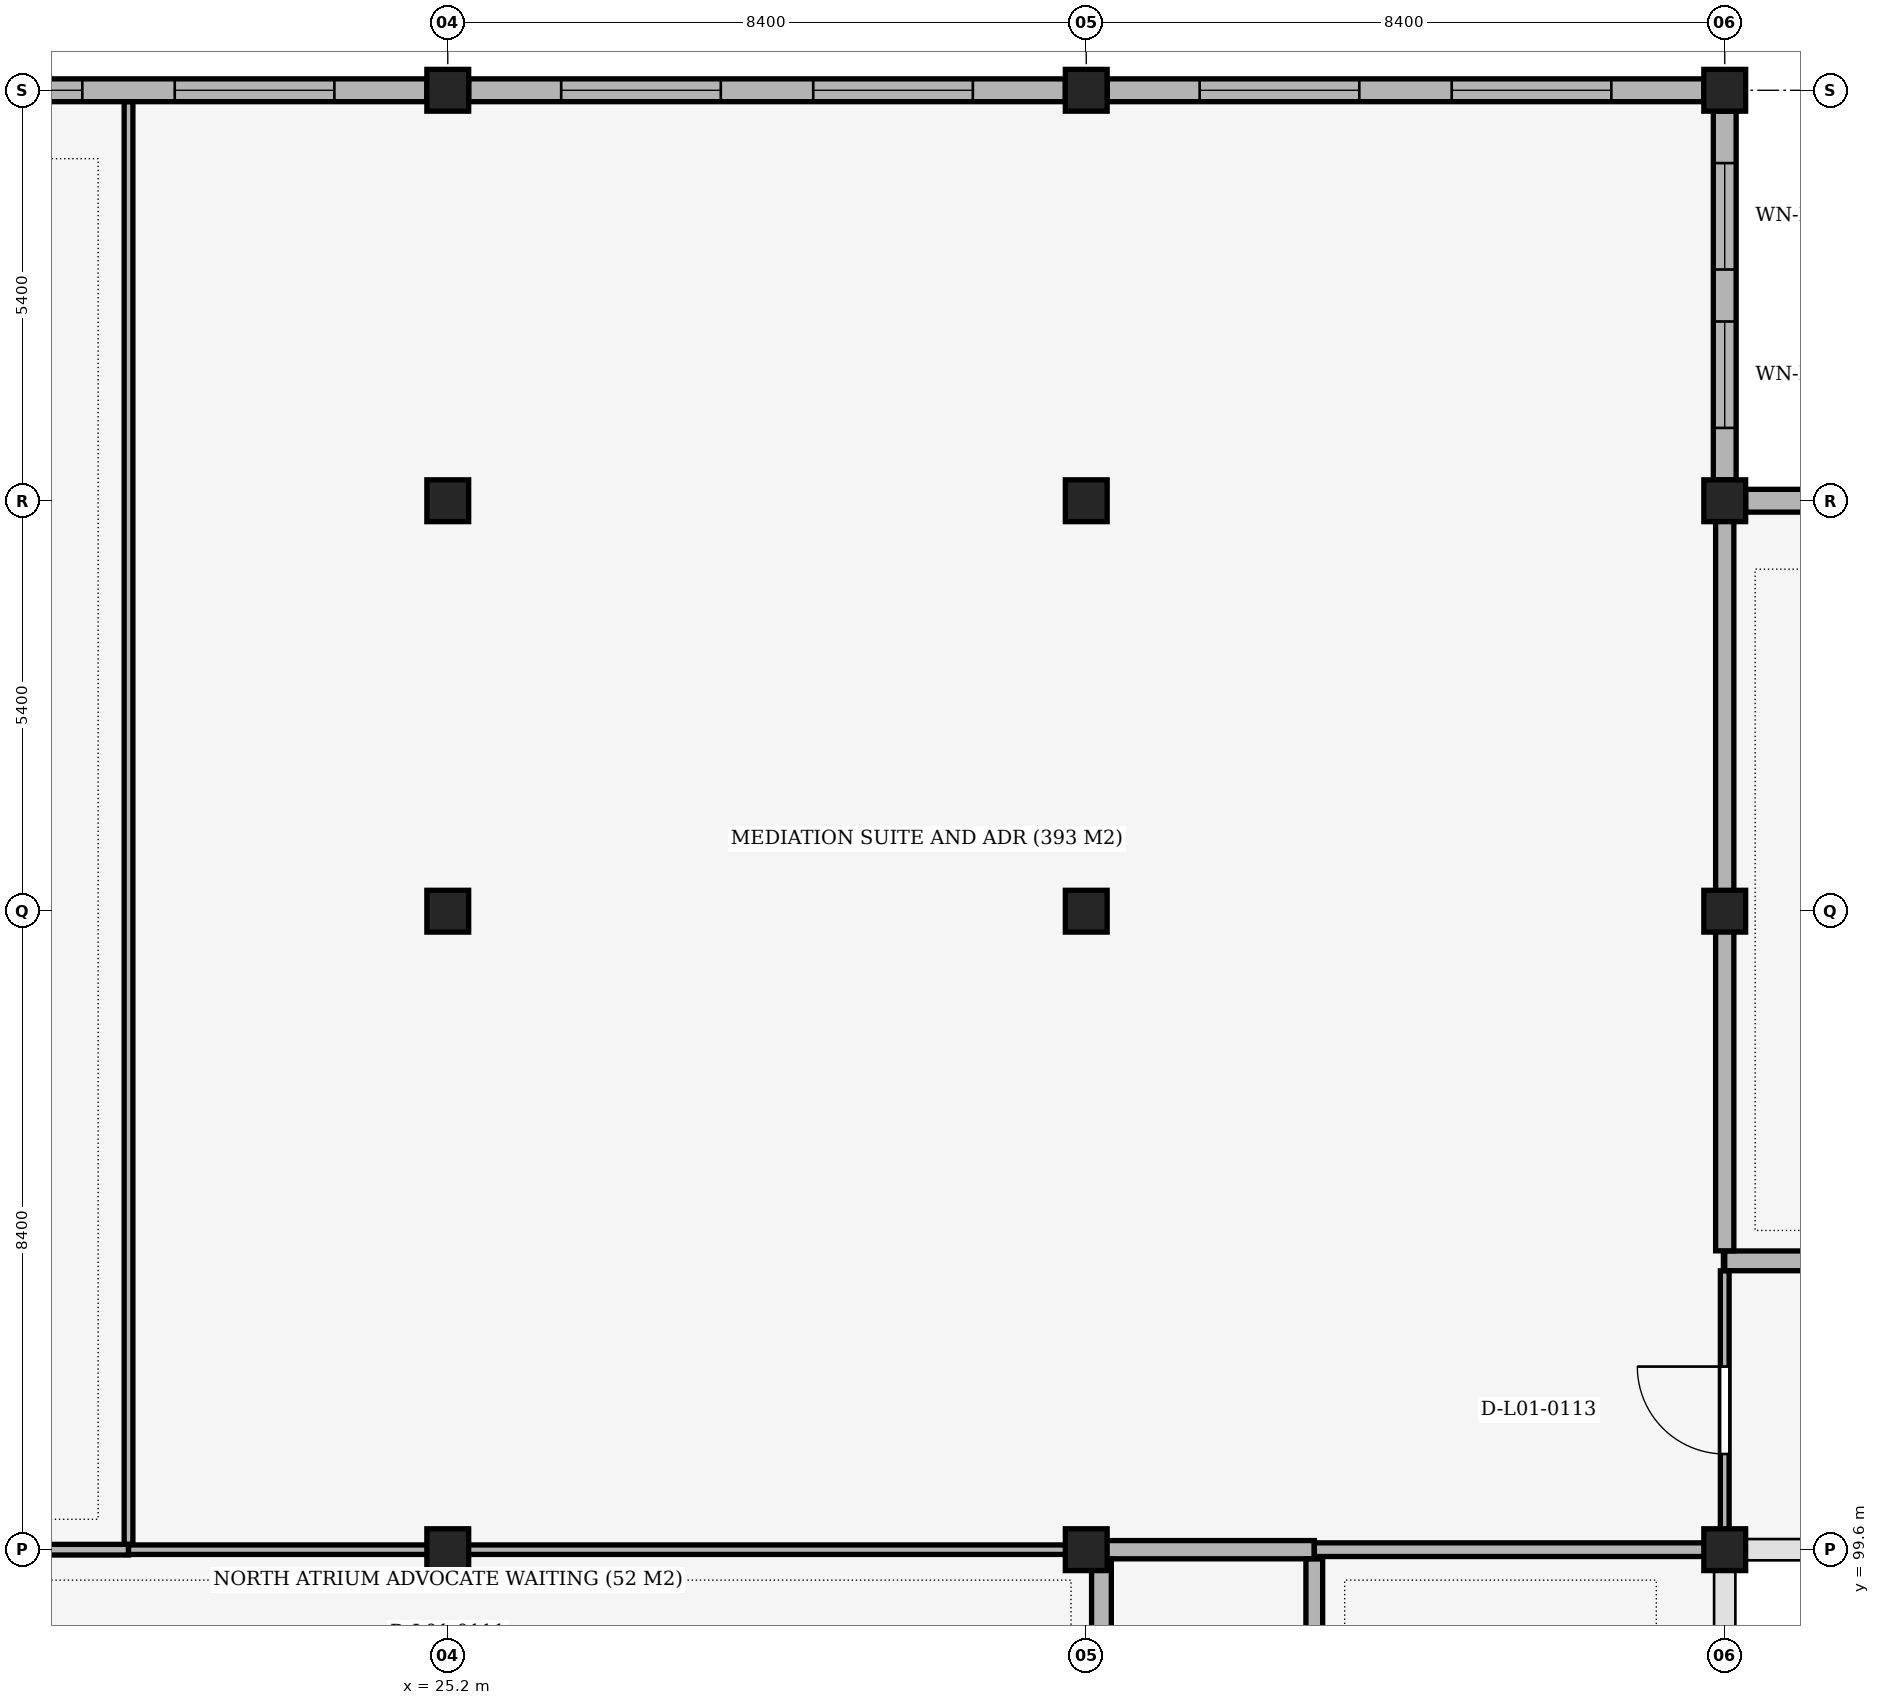
"""IFC4 building model, lengths in metres.
Left out: names, types, materials, properties, quantities, classifications, styles, units other than length and angle.
Written with IfcOpenShell. Run it as: python <this file> out.ifc"""

import sys

from ifc_helpers import new_model, si_unit, direction, frame, frame_2d, origin, origin_2d, place, context, subcontext, project, spatial, rectangle, extrude, element, fill, save


model = new_model("IFC4")
c1 = context("Model", 3, precision=1e-05, world=origin(), true_north=direction((0.0, 1.0)))
c2 = subcontext(c1, "Body", "Model", "MODEL_VIEW")
j1 = project(units=[si_unit("LENGTHUNIT", "METRE"), si_unit("PLANEANGLEUNIT", "RADIAN")], contexts=[c1])
p1 = place(None, origin())
s1 = spatial("IfcSite", under=j1, at=p1, CompositionType="ELEMENT")
p2 = place(p1, origin())
s2 = spatial("IfcBuilding", under=s1, at=p2, CompositionType="ELEMENT")
p3 = place(p2, frame((0.0, 0.0, 5.1)))
s3 = spatial("IfcBuildingStorey", under=s2, at=p3, CompositionType="ELEMENT", Elevation=5.1)
for number, where, z_axis, x_axis in (
    (1, (25.2, 99.6, 0.0), (0.0, 0.0, 1.0), (1.0, 0.0, 0.0)),
    (2, (25.2, 108.0, 0.0), (0.0, 0.0, 1.0), (1.0, 0.0, 0.0)),
    (3, (25.2, 113.4, 0.0), (0.0, 0.0, 1.0), (1.0, 0.0, 0.0)),
    (4, (25.2, 118.8, 0.0), (0.0, 0.0, 1.0), (1.0, 0.0, 0.0)),
    (5, (33.6, 99.6, 0.0), (0.0, 0.0, 1.0), (1.0, 0.0, 0.0)),
    (6, (33.6, 108.0, 0.0), (0.0, 0.0, 1.0), (1.0, 0.0, 0.0)),
    (7, (33.6, 113.4, 0.0), (0.0, 0.0, 1.0), (1.0, 0.0, 0.0)),
    (8, (33.6, 118.8, 0.0), (0.0, 0.0, 1.0), (1.0, 0.0, 0.0)),
    (9, (42.0, 99.6, 0.0), (0.0, 0.0, 1.0), (1.0, 0.0, 0.0)),
    (10, (42.0, 108.0, 0.0), (0.0, 0.0, 1.0), (1.0, 0.0, 0.0)),
    (11, (42.0, 113.4, 0.0), (0.0, 0.0, 1.0), (1.0, 0.0, 0.0)),
    (12, (42.0, 118.8, 0.0), (0.0, 0.0, 1.0), (1.0, 0.0, 0.0)),
):
    element("IfcColumn", number, at=place(p3, frame(where, z_axis=z_axis, x_axis=x_axis)), inside=s3, PredefinedType="COLUMN", context=c2, shape_type="SweptSolid", body=[
        extrude(rectangle(XDim=0.55, YDim=0.55, at=origin_2d()), origin(), (0.0, 0.0, 1.0), 5.1),
    ])
p4 = place(p3, frame((17.075, 118.8, 0.0), z_axis=(0.0, 0.0, 1.0), x_axis=(1.0, 0.0, 0.0)))
e13 = element("IfcWall", 13, at=p4, inside=s3, PredefinedType="SOLIDWALL", context=c2, shape_type="SweptSolid", body=[
    extrude(rectangle(XDim=7.85, YDim=0.3, at=frame_2d((3.925, 0.0))), origin(), (0.0, 0.0, 1.0), 4.43),
])
p5 = place(p4, frame((1.217, 0.0, 0.9)))
e14 = element("IfcOpeningElement", 14, at=p5, cuts=e13, PredefinedType="OPENING", context=c2, shape_type="SweptSolid", body=[
    extrude(rectangle(XDim=2.1, YDim=2.1, at=frame_2d((1.05, 1.05))), frame((0.0, 0.165, 0.0), z_axis=(0.0, -1.0, 0.0), x_axis=(1.0, 0.0, 0.0)), (0.0, 0.0, 1.0), 0.33),
])
p6 = place(p4, frame((4.533, 0.0, 0.9)))
e15 = element("IfcOpeningElement", 15, at=p6, cuts=e13, PredefinedType="OPENING", context=c2, shape_type="SweptSolid", body=[
    extrude(rectangle(XDim=2.1, YDim=2.1, at=frame_2d((1.05, 1.05))), frame((0.0, 0.165, 0.0), z_axis=(0.0, -1.0, 0.0), x_axis=(1.0, 0.0, 0.0)), (0.0, 0.0, 1.0), 0.33),
])
p7 = place(p3, frame((25.475, 118.8, 0.0), z_axis=(0.0, 0.0, 1.0), x_axis=(1.0, 0.0, 0.0)))
e16 = element("IfcWall", 16, at=p7, inside=s3, PredefinedType="SOLIDWALL", context=c2, shape_type="SweptSolid", body=[
    extrude(rectangle(XDim=7.85, YDim=0.3, at=frame_2d((3.925, 0.0))), origin(), (0.0, 0.0, 1.0), 4.43),
])
p8 = place(p7, frame((1.217, 0.0, 0.9)))
e17 = element("IfcOpeningElement", 17, at=p8, cuts=e16, PredefinedType="OPENING", context=c2, shape_type="SweptSolid", body=[
    extrude(rectangle(XDim=2.1, YDim=2.1, at=frame_2d((1.05, 1.05))), frame((0.0, 0.165, 0.0), z_axis=(0.0, -1.0, 0.0), x_axis=(1.0, 0.0, 0.0)), (0.0, 0.0, 1.0), 0.33),
])
p9 = place(p7, frame((4.533, 0.0, 0.9)))
e18 = element("IfcOpeningElement", 18, at=p9, cuts=e16, PredefinedType="OPENING", context=c2, shape_type="SweptSolid", body=[
    extrude(rectangle(XDim=2.1, YDim=2.1, at=frame_2d((1.05, 1.05))), frame((0.0, 0.165, 0.0), z_axis=(0.0, -1.0, 0.0), x_axis=(1.0, 0.0, 0.0)), (0.0, 0.0, 1.0), 0.33),
])
p10 = place(p3, frame((33.875, 118.8, 0.0), z_axis=(0.0, 0.0, 1.0), x_axis=(1.0, 0.0, 0.0)))
e19 = element("IfcWall", 19, at=p10, inside=s3, PredefinedType="SOLIDWALL", context=c2, shape_type="SweptSolid", body=[
    extrude(rectangle(XDim=7.85, YDim=0.3, at=frame_2d((3.925, 0.0))), origin(), (0.0, 0.0, 1.0), 4.43),
])
p11 = place(p10, frame((1.217, 0.0, 0.9)))
e20 = element("IfcOpeningElement", 20, at=p11, cuts=e19, PredefinedType="OPENING", context=c2, shape_type="SweptSolid", body=[
    extrude(rectangle(XDim=2.1, YDim=2.1, at=frame_2d((1.05, 1.05))), frame((0.0, 0.165, 0.0), z_axis=(0.0, -1.0, 0.0), x_axis=(1.0, 0.0, 0.0)), (0.0, 0.0, 1.0), 0.33),
])
p12 = place(p10, frame((4.533, 0.0, 0.9)))
e21 = element("IfcOpeningElement", 21, at=p12, cuts=e19, PredefinedType="OPENING", context=c2, shape_type="SweptSolid", body=[
    extrude(rectangle(XDim=2.1, YDim=2.1, at=frame_2d((1.05, 1.05))), frame((0.0, 0.165, 0.0), z_axis=(0.0, -1.0, 0.0), x_axis=(1.0, 0.0, 0.0)), (0.0, 0.0, 1.0), 0.33),
])
p13 = place(p3, frame((42.0, 118.525, 0.0), z_axis=(0.0, 0.0, 1.0), x_axis=(0.0, -1.0, 0.0)))
e22 = element("IfcWall", 22, at=p13, inside=s3, PredefinedType="SOLIDWALL", context=c2, shape_type="SweptSolid", body=[
    extrude(rectangle(XDim=4.85, YDim=0.3, at=frame_2d((2.425, 0.0))), origin(), (0.0, 0.0, 1.0), 4.27),
])
p14 = place(p13, frame((0.683, 0.0, 0.85)))
e23 = element("IfcOpeningElement", 23, at=p14, cuts=e22, PredefinedType="OPENING", context=c2, shape_type="SweptSolid", body=[
    extrude(rectangle(XDim=1.4, YDim=2.4, at=frame_2d((0.7, 1.2))), frame((0.0, 0.165, 0.0), z_axis=(0.0, -1.0, 0.0), x_axis=(1.0, 0.0, 0.0)), (0.0, 0.0, 1.0), 0.33),
])
p15 = place(p13, frame((2.767, 0.0, 0.85)))
e24 = element("IfcOpeningElement", 24, at=p15, cuts=e22, PredefinedType="OPENING", context=c2, shape_type="SweptSolid", body=[
    extrude(rectangle(XDim=1.4, YDim=2.4, at=frame_2d((0.7, 1.2))), frame((0.0, 0.165, 0.0), z_axis=(0.0, -1.0, 0.0), x_axis=(1.0, 0.0, 0.0)), (0.0, 0.0, 1.0), 0.33),
])
p16 = place(p3, frame((42.275, 113.4, 0.0), z_axis=(0.0, 0.0, 1.0), x_axis=(1.0, 0.0, 0.0)))
e25 = element("IfcWall", 25, at=p16, inside=s3, PredefinedType="SOLIDWALL", context=c2, shape_type="SweptSolid", body=[
    extrude(rectangle(XDim=7.85, YDim=0.3, at=frame_2d((3.925, 0.0))), origin(), (0.0, 0.0, 1.0), 4.12),
])
p17 = place(p16, frame((1.217, 0.0, 0.9)))
e26 = element("IfcOpeningElement", 26, at=p17, cuts=e25, PredefinedType="OPENING", context=c2, shape_type="SweptSolid", body=[
    extrude(rectangle(XDim=2.1, YDim=2.1, at=frame_2d((1.05, 1.05))), frame((0.0, 0.165, 0.0), z_axis=(0.0, -1.0, 0.0), x_axis=(1.0, 0.0, 0.0)), (0.0, 0.0, 1.0), 0.33),
])
p18 = place(p16, frame((4.533, 0.0, 0.9)))
e27 = element("IfcOpeningElement", 27, at=p18, cuts=e25, PredefinedType="OPENING", context=c2, shape_type="SweptSolid", body=[
    extrude(rectangle(XDim=2.1, YDim=2.1, at=frame_2d((1.05, 1.05))), frame((0.0, 0.165, 0.0), z_axis=(0.0, -1.0, 0.0), x_axis=(1.0, 0.0, 0.0)), (0.0, 0.0, 1.0), 0.33),
])
p19 = place(p3, frame((33.8, 99.6, 0.0), z_axis=(0.0, 0.0, 1.0), x_axis=(1.0, 0.0, 0.0)))
e28 = element("IfcWall", 28, at=p19, inside=s3, PredefinedType="PARTITIONING", context=c2, shape_type="SweptSolid", body=[
    extrude(rectangle(XDim=2.8, YDim=0.24, at=frame_2d((1.4, 0.0))), origin(), (0.0, 0.0, 1.0), 4.12),
])
p20 = place(p3, frame((36.6, 99.6, 0.0), z_axis=(0.0, 0.0, 1.0), x_axis=(1.0, 0.0, 0.0)))
e29 = element("IfcWall", 29, at=p20, inside=s3, PredefinedType="PARTITIONING", context=c2, shape_type="SweptSolid", body=[
    extrude(rectangle(XDim=5.336, YDim=0.18, at=frame_2d((2.668, 0.0))), origin(), (0.0, 0.0, 1.0), 4.02),
])
p21 = place(p3, frame((16.6, 99.6, 0.0), z_axis=(0.0, 0.0, 1.0), x_axis=(1.0, 0.0, 0.0)))
e30 = element("IfcWall", 30, at=p21, inside=s3, PredefinedType="PARTITIONING", context=c2, shape_type="SweptSolid", body=[
    extrude(rectangle(XDim=4.4, YDim=0.14, at=frame_2d((2.2, 0.0))), origin(), (0.0, 0.0, 1.0), 4.02),
])
p22 = place(p3, frame((21.0, 99.6, 0.0), z_axis=(0.0, 0.0, 1.0), x_axis=(1.0, 0.0, 0.0)))
e31 = element("IfcWall", 31, at=p22, inside=s3, PredefinedType="PARTITIONING", context=c2, shape_type="SweptSolid", body=[
    extrude(rectangle(XDim=12.8, YDim=0.125, at=frame_2d((6.4, 0.0))), origin(), (0.0, 0.0, 1.0), 4.02),
])
p23 = place(p3, frame((42.0, 103.4, 0.0), z_axis=(0.0, 0.0, 1.0), x_axis=(1.0, 0.0, 0.0)))
e32 = element("IfcWall", 32, at=p23, inside=s3, PredefinedType="PARTITIONING", context=c2, shape_type="SweptSolid", body=[
    extrude(rectangle(XDim=25.2, YDim=0.26, at=frame_2d((12.6, 0.0))), origin(), (0.0, 0.0, 1.0), 4.02),
])
p24 = place(p23, frame((11.7, 0.0, 0.0)))
e33 = element("IfcOpeningElement", 33, at=p24, cuts=e32, PredefinedType="OPENING", context=c2, shape_type="SweptSolid", body=[
    extrude(rectangle(XDim=1.8, YDim=2.4, at=frame_2d((0.9, 1.2))), frame((0.0, 0.145, 0.0), z_axis=(0.0, -1.0, 0.0), x_axis=(1.0, 0.0, 0.0)), (0.0, 0.0, 1.0), 0.29),
])
p25 = place(p3, frame((21.0, 99.672, 0.0), z_axis=(0.0, 0.0, 1.0), x_axis=(0.0, 1.0, 0.0)))
e34 = element("IfcWall", 34, at=p25, inside=s3, PredefinedType="PARTITIONING", context=c2, shape_type="SweptSolid", body=[
    extrude(rectangle(XDim=18.976, YDim=0.115, at=frame_2d((9.488, 0.0))), origin(), (0.0, 0.0, 1.0), 4.12),
])
p26 = place(p3, frame((33.8, 96.722, 0.0), z_axis=(0.0, 0.0, 1.0), x_axis=(0.0, 1.0, 0.0)))
e35 = element("IfcWall", 35, at=p26, inside=s3, PredefinedType="PARTITIONING", context=c2, shape_type="SweptSolid", body=[
    extrude(rectangle(XDim=2.756, YDim=0.26, at=frame_2d((1.378, 0.0))), origin(), (0.0, 0.0, 1.0), 4.12),
])
p27 = place(p3, frame((36.6, 66.112, 0.0), z_axis=(0.0, 0.0, 1.0), x_axis=(0.0, 1.0, 0.0)))
e36 = element("IfcWall", 36, at=p27, inside=s3, PredefinedType="PARTITIONING", context=c2, shape_type="SweptSolid", body=[
    extrude(rectangle(XDim=33.366, YDim=0.22, at=frame_2d((16.683, 0.0))), origin(), (0.0, 0.0, 1.0), 4.07),
])
p28 = place(p27, frame((15.883, 0.0, 0.0)))
e37 = element("IfcOpeningElement", 37, at=p28, cuts=e36, PredefinedType="OPENING", context=c2, shape_type="SweptSolid", body=[
    extrude(rectangle(XDim=1.6, YDim=2.3, at=frame_2d((0.8, 1.15))), frame((0.0, 0.125, 0.0), z_axis=(0.0, -1.0, 0.0), x_axis=(1.0, 0.0, 0.0)), (0.0, 0.0, 1.0), 0.25),
])
p29 = place(p3, frame((42.0, 99.6, 0.0), z_axis=(0.0, 0.0, 1.0), x_axis=(0.0, 1.0, 0.0)))
e38 = element("IfcWall", 38, at=p29, inside=s3, PredefinedType="PARTITIONING", context=c2, shape_type="SweptSolid", body=[
    extrude(rectangle(XDim=3.668, YDim=0.115, at=frame_2d((1.834, 0.0))), origin(), (0.0, 0.0, 1.0), 4.02),
])
p30 = place(p29, frame((1.259, 0.0, 0.0)))
e39 = element("IfcOpeningElement", 39, at=p30, cuts=e38, PredefinedType="OPENING", context=c2, shape_type="SweptSolid", body=[
    extrude(rectangle(XDim=1.15, YDim=2.15, at=frame_2d((0.575, 1.075))), frame((0.0, 0.072, 0.0), z_axis=(0.0, -1.0, 0.0), x_axis=(1.0, 0.0, 0.0)), (0.0, 0.0, 1.0), 0.145),
])
p31 = place(p3, frame((42.0, 103.532, 0.0), z_axis=(0.0, 0.0, 1.0), x_axis=(0.0, 1.0, 0.0)))
e40 = element("IfcWall", 40, at=p31, inside=s3, PredefinedType="PARTITIONING", context=c2, shape_type="SweptSolid", body=[
    extrude(rectangle(XDim=9.794, YDim=0.24, at=frame_2d((4.897, 0.0))), origin(), (0.0, 0.0, 1.0), 4.02),
])
p32 = place(p5, origin())
e41 = element("IfcWindow", 41, at=p32, inside=s3, PartitioningType="SINGLE_PANEL", PredefinedType="WINDOW", context=c2, shape_type="SweptSolid", body=[
    extrude(rectangle(XDim=2.1, YDim=2.1, at=frame_2d((1.05, 1.05))), frame((0.0, 0.03, 0.0), z_axis=(0.0, -1.0, 0.0), x_axis=(1.0, 0.0, 0.0)), (0.0, 0.0, 1.0), 0.06),
])
fill(e14, e41)
p33 = place(p6, origin())
e42 = element("IfcWindow", 42, at=p33, inside=s3, PartitioningType="SINGLE_PANEL", PredefinedType="WINDOW", context=c2, shape_type="SweptSolid", body=[
    extrude(rectangle(XDim=2.1, YDim=2.1, at=frame_2d((1.05, 1.05))), frame((0.0, 0.03, 0.0), z_axis=(0.0, -1.0, 0.0), x_axis=(1.0, 0.0, 0.0)), (0.0, 0.0, 1.0), 0.06),
])
fill(e15, e42)
p34 = place(p8, origin())
e43 = element("IfcWindow", 43, at=p34, inside=s3, PartitioningType="SINGLE_PANEL", PredefinedType="WINDOW", context=c2, shape_type="SweptSolid", body=[
    extrude(rectangle(XDim=2.1, YDim=2.1, at=frame_2d((1.05, 1.05))), frame((0.0, 0.03, 0.0), z_axis=(0.0, -1.0, 0.0), x_axis=(1.0, 0.0, 0.0)), (0.0, 0.0, 1.0), 0.06),
])
fill(e17, e43)
p35 = place(p9, origin())
e44 = element("IfcWindow", 44, at=p35, inside=s3, PartitioningType="SINGLE_PANEL", PredefinedType="WINDOW", context=c2, shape_type="SweptSolid", body=[
    extrude(rectangle(XDim=2.1, YDim=2.1, at=frame_2d((1.05, 1.05))), frame((0.0, 0.03, 0.0), z_axis=(0.0, -1.0, 0.0), x_axis=(1.0, 0.0, 0.0)), (0.0, 0.0, 1.0), 0.06),
])
fill(e18, e44)
p36 = place(p11, origin())
e45 = element("IfcWindow", 45, at=p36, inside=s3, PartitioningType="SINGLE_PANEL", PredefinedType="WINDOW", context=c2, shape_type="SweptSolid", body=[
    extrude(rectangle(XDim=2.1, YDim=2.1, at=frame_2d((1.05, 1.05))), frame((0.0, 0.03, 0.0), z_axis=(0.0, -1.0, 0.0), x_axis=(1.0, 0.0, 0.0)), (0.0, 0.0, 1.0), 0.06),
])
fill(e20, e45)
p37 = place(p12, origin())
e46 = element("IfcWindow", 46, at=p37, inside=s3, PartitioningType="SINGLE_PANEL", PredefinedType="WINDOW", context=c2, shape_type="SweptSolid", body=[
    extrude(rectangle(XDim=2.1, YDim=2.1, at=frame_2d((1.05, 1.05))), frame((0.0, 0.03, 0.0), z_axis=(0.0, -1.0, 0.0), x_axis=(1.0, 0.0, 0.0)), (0.0, 0.0, 1.0), 0.06),
])
fill(e21, e46)
p38 = place(p14, origin())
e47 = element("IfcWindow", 47, at=p38, inside=s3, PartitioningType="SINGLE_PANEL", PredefinedType="WINDOW", context=c2, shape_type="SweptSolid", body=[
    extrude(rectangle(XDim=1.4, YDim=2.4, at=frame_2d((0.7, 1.2))), frame((0.0, 0.03, 0.0), z_axis=(0.0, -1.0, 0.0), x_axis=(1.0, 0.0, 0.0)), (0.0, 0.0, 1.0), 0.06),
])
fill(e23, e47)
p39 = place(p15, origin())
e48 = element("IfcWindow", 48, at=p39, inside=s3, PartitioningType="SINGLE_PANEL", PredefinedType="WINDOW", context=c2, shape_type="SweptSolid", body=[
    extrude(rectangle(XDim=1.4, YDim=2.4, at=frame_2d((0.7, 1.2))), frame((0.0, 0.03, 0.0), z_axis=(0.0, -1.0, 0.0), x_axis=(1.0, 0.0, 0.0)), (0.0, 0.0, 1.0), 0.06),
])
fill(e24, e48)
p40 = place(p30, origin())
e49 = element("IfcDoor", 49, at=p40, inside=s3, OperationType="SINGLE_SWING_RIGHT", PredefinedType="DOOR", context=c2, shape_type="SweptSolid", body=[
    extrude(rectangle(XDim=1.15, YDim=2.15, at=frame_2d((0.575, 1.075))), frame((0.0, 0.025, 0.0), z_axis=(0.0, -1.0, 0.0), x_axis=(1.0, 0.0, 0.0)), (0.0, 0.0, 1.0), 0.05),
])
fill(e39, e49)
save(model, sys.argv[1])
